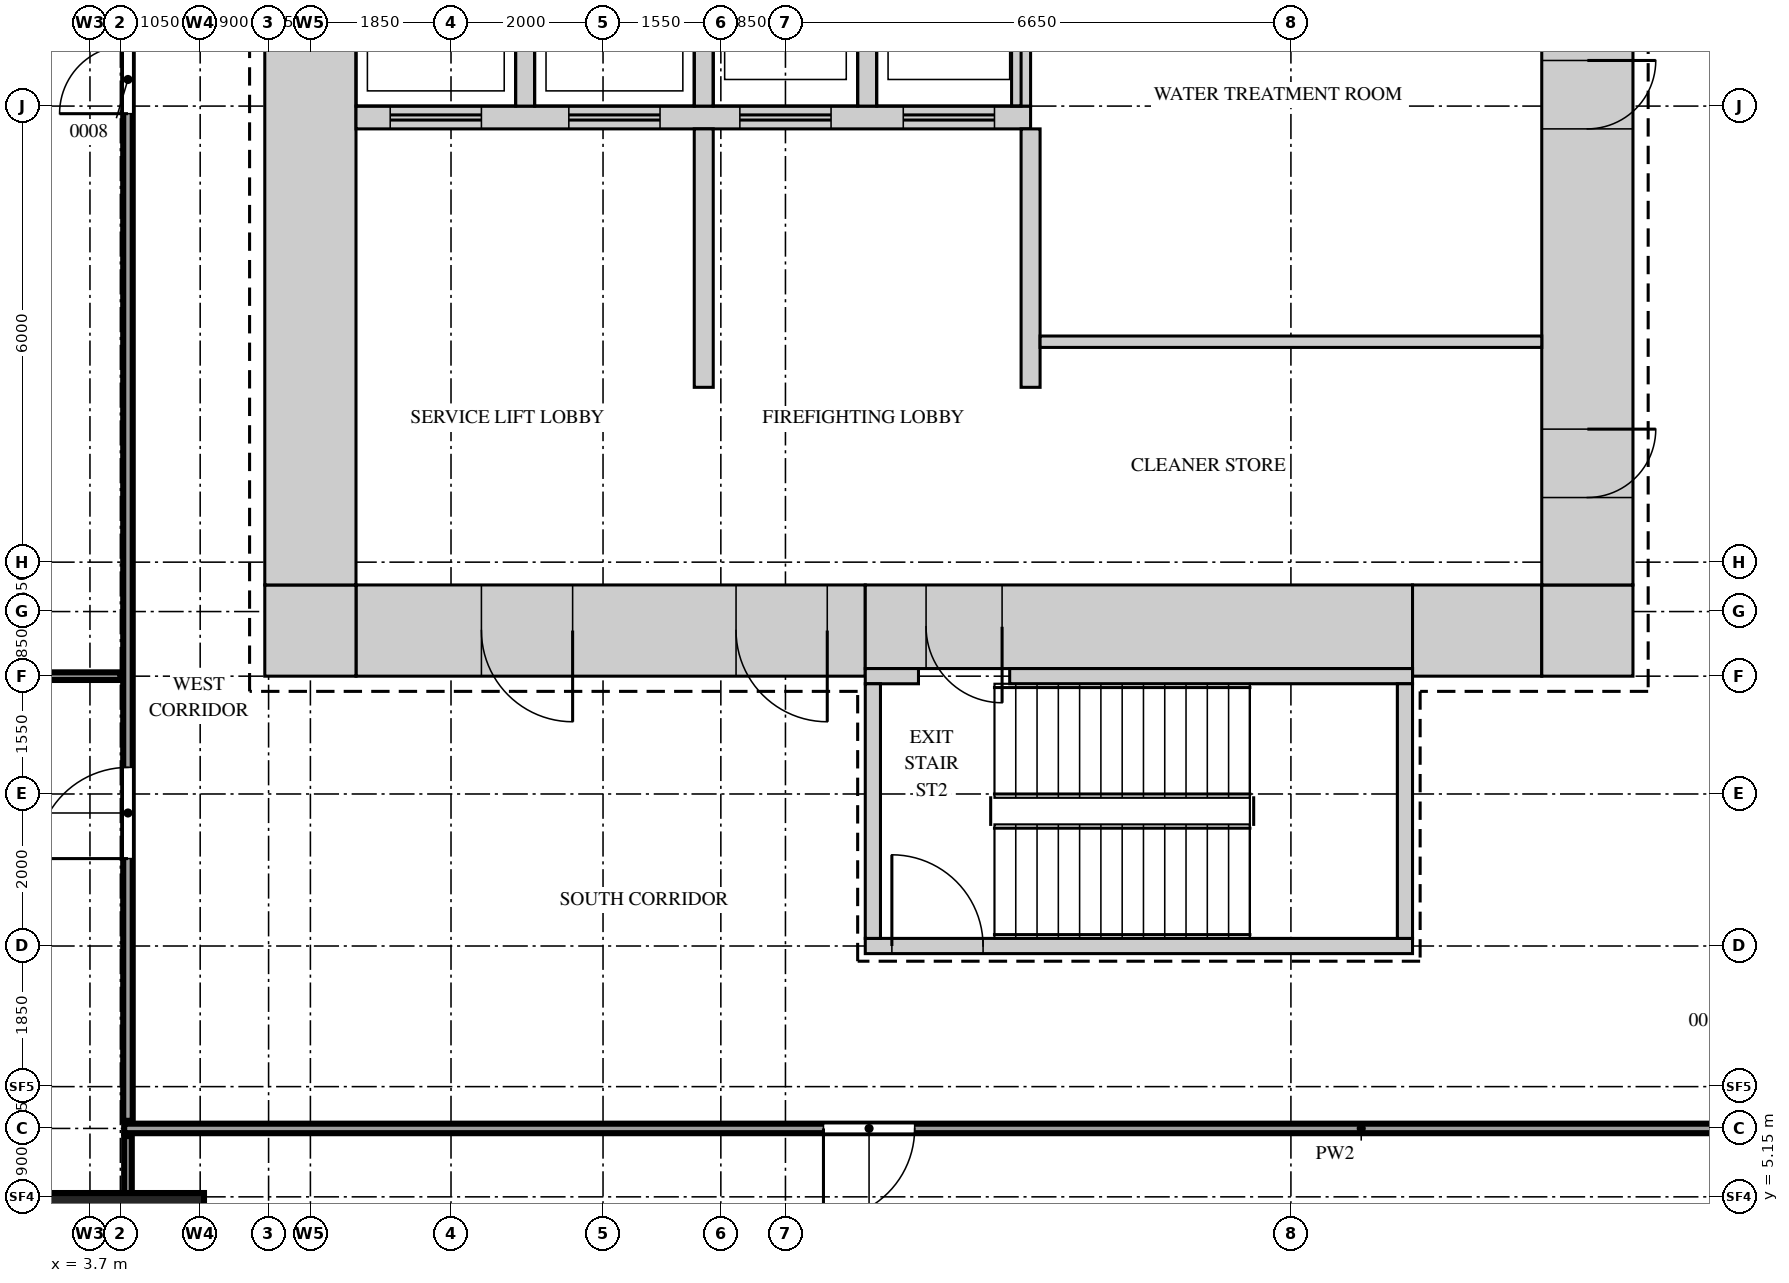
"""IFC4 building model, lengths in metres.
Left out: names, types, materials, properties, quantities, classifications, styles, units other than length and angle.
Written with IfcOpenShell. Run it as: python <this file> out.ifc"""

import sys

from ifc_helpers import new_model, si_unit, direction, frame, frame_2d, origin, origin_2d, place, context, subcontext, project, spatial, rectangle, extrude, source, transform, mapped, element, fill, save


model = new_model("IFC4")
c1 = context("Model", 3, precision=1e-05, world=origin(), true_north=direction((0.0, 1.0)))
c2 = subcontext(c1, "Body", "Model", "MODEL_VIEW")
j1 = project(units=[si_unit("LENGTHUNIT", "METRE"), si_unit("PLANEANGLEUNIT", "RADIAN")], contexts=[c1])
p1 = place(None, origin())
s1 = spatial("IfcSite", under=j1, at=p1, CompositionType="ELEMENT")
p2 = place(p1, origin())
s2 = spatial("IfcBuilding", under=s1, at=p2, CompositionType="ELEMENT")
p3 = place(p2, frame((0.0, 0.0, 82.5)))
s3 = spatial("IfcBuildingStorey", under=s2, at=p3, CompositionType="ELEMENT", Elevation=82.5)
m1 = source(origin(), c2, "Body", "SweptSolid", [
    extrude(rectangle(XDim=6.7, YDim=1.2, at=frame_2d((3.35, 0.0))), origin(), (0.0, 0.0, 1.0), 4.2),
])
p4 = place(p3, frame((7.2, 12.6, 0.0), z_axis=(0.0, 0.0, 1.0), x_axis=(1.0, 0.0, 0.0)))
e1 = element("IfcWall", 1, at=p4, inside=s3, PredefinedType="SHEAR", context=c2, shape_type="MappedRepresentation", body=[
    mapped(m1, transform((0.0, 0.0, 0.0))),
])
m2 = source(origin(), c2, "Body", "SweptSolid", [
    extrude(rectangle(XDim=1.2, YDim=2.1, at=frame_2d((0.6, 1.05))), frame((0.0, 0.61, 0.0), z_axis=(0.0, -1.0, 0.0), x_axis=(1.0, 0.0, 0.0)), (0.0, 0.0, 1.0), 1.22),
])
p5 = place(p4, frame((5.0, 0.0, 0.0)))
e2 = element("IfcOpeningElement", 2, at=p5, cuts=e1, PredefinedType="OPENING", context=c2, shape_type="MappedRepresentation", body=[
    mapped(m2, transform((0.0, 0.0, 0.0))),
])
p6 = place(p4, frame((1.65, 0.0, 0.0)))
e3 = element("IfcOpeningElement", 3, at=p6, cuts=e1, PredefinedType="OPENING", context=c2, shape_type="MappedRepresentation", body=[
    mapped(m2, transform((0.0, 0.0, 0.0))),
])
m3 = source(origin(), c2, "Body", "SweptSolid", [
    extrude(rectangle(XDim=7.2, YDim=1.1, at=frame_2d((3.6, 0.0))), origin(), (0.0, 0.0, 1.0), 4.2),
])
p7 = place(p3, frame((13.9, 12.65, 0.0), z_axis=(0.0, 0.0, 1.0), x_axis=(1.0, 0.0, 0.0)))
e4 = element("IfcWall", 4, at=p7, inside=s3, PredefinedType="SHEAR", context=c2, shape_type="MappedRepresentation", body=[
    mapped(m3, transform((0.0, 0.0, 0.0))),
])
m4 = source(origin(), c2, "Body", "SweptSolid", [
    extrude(rectangle(XDim=1.0, YDim=2.1, at=frame_2d((0.5, 1.05))), frame((0.0, 0.56, 0.0), z_axis=(0.0, -1.0, 0.0), x_axis=(1.0, 0.0, 0.0)), (0.0, 0.0, 1.0), 1.12),
])
p8 = place(p7, frame((0.8, 0.0, 0.0)))
e5 = element("IfcOpeningElement", 5, at=p8, cuts=e4, PredefinedType="OPENING", context=c2, shape_type="MappedRepresentation", body=[
    mapped(m4, transform((0.0, 0.0, 0.0))),
])
m5 = source(origin(), c2, "Body", "SweptSolid", [
    extrude(rectangle(XDim=1.7, YDim=1.2, at=frame_2d((0.85, 0.0))), origin(), (0.0, 0.0, 1.0), 4.2),
])
p9 = place(p3, frame((21.1, 12.6, 0.0), z_axis=(0.0, 0.0, 1.0), x_axis=(1.0, 0.0, 0.0)))
e6 = element("IfcWall", 6, at=p9, inside=s3, PredefinedType="SHEAR", context=c2, shape_type="MappedRepresentation", body=[
    mapped(m5, transform((0.0, 0.0, 0.0))),
])
m6 = source(origin(), c2, "Body", "SweptSolid", [
    extrude(rectangle(XDim=1.2, YDim=1.2, at=frame_2d((0.6, 0.0))), origin(), (0.0, 0.0, 1.0), 4.2),
])
for number, where, z_axis, x_axis in (
    (7, (22.8, 12.6, 0.0), (0.0, 0.0, 1.0), (1.0, 0.0, 0.0)),
    (8, (6.0, 12.6, 0.0), (0.0, 0.0, 1.0), (1.0, 0.0, 0.0)),
):
    element("IfcWall", number, at=place(p3, frame(where, z_axis=z_axis, x_axis=x_axis)), inside=s3, PredefinedType="SHEAR", context=c2, shape_type="MappedRepresentation", body=[
        mapped(m6, transform((0.0, 0.0, 0.0))),
    ])
m7 = source(origin(), c2, "Body", "SweptSolid", [
    extrude(rectangle(XDim=27.6, YDim=1.2, at=frame_2d((13.8, 0.0))), origin(), (0.0, 0.0, 1.0), 4.2),
])
p10 = place(p3, frame((23.4, 13.2, 0.0), z_axis=(0.0, 0.0, 1.0), x_axis=(0.0, 1.0, 0.0)))
e9 = element("IfcWall", 9, at=p10, inside=s3, PredefinedType="SHEAR", context=c2, shape_type="MappedRepresentation", body=[
    mapped(m7, transform((0.0, 0.0, 0.0))),
])
m8 = source(origin(), c2, "Body", "SweptSolid", [
    extrude(rectangle(XDim=1.8, YDim=2.1, at=frame_2d((0.9, 1.05))), frame((0.0, 0.61, 0.0), z_axis=(0.0, -1.0, 0.0), x_axis=(1.0, 0.0, 0.0)), (0.0, 0.0, 1.0), 1.22),
])
p11 = place(p10, frame((22.4, 0.0, 0.0)))
e10 = element("IfcOpeningElement", 10, at=p11, cuts=e9, PredefinedType="OPENING", context=c2, shape_type="MappedRepresentation", body=[
    mapped(m8, transform((0.0, 0.0, 0.0))),
])
p12 = place(p10, frame((14.4, 0.0, 0.0)))
e11 = element("IfcOpeningElement", 11, at=p12, cuts=e9, PredefinedType="OPENING", context=c2, shape_type="MappedRepresentation", body=[
    mapped(m2, transform((0.0, 0.0, 0.0))),
])
m9 = source(origin(), c2, "Body", "SweptSolid", [
    extrude(rectangle(XDim=0.9, YDim=2.1, at=frame_2d((0.45, 1.05))), frame((0.0, 0.61, 0.0), z_axis=(0.0, -1.0, 0.0), x_axis=(1.0, 0.0, 0.0)), (0.0, 0.0, 1.0), 1.22),
])
p13 = place(p10, frame((1.15, 0.0, 0.0)))
e12 = element("IfcOpeningElement", 12, at=p13, cuts=e9, PredefinedType="OPENING", context=c2, shape_type="MappedRepresentation", body=[
    mapped(m9, transform((0.0, 0.0, 0.0))),
])
p14 = place(p10, frame((6.0, 0.0, 0.0)))
e13 = element("IfcOpeningElement", 13, at=p14, cuts=e9, PredefinedType="OPENING", context=c2, shape_type="MappedRepresentation", body=[
    mapped(m9, transform((0.0, 0.0, 0.0))),
])
p15 = place(p3, frame((6.6, 13.2, 0.0), z_axis=(0.0, 0.0, 1.0), x_axis=(0.0, 1.0, 0.0)))
e14 = element("IfcWall", 14, at=p15, inside=s3, PredefinedType="SHEAR", context=c2, shape_type="MappedRepresentation", body=[
    mapped(m7, transform((0.0, 0.0, 0.0))),
])
m10 = source(origin(), c2, "Body", "SweptSolid", [
    extrude(rectangle(XDim=0.7, YDim=0.2, at=frame_2d((0.35, 0.0))), origin(), (0.0, 0.0, 1.0), 4.2),
])
p16 = place(p3, frame((13.9, 12.0, 0.0), z_axis=(0.0, 0.0, 1.0), x_axis=(1.0, 0.0, 0.0)))
e15 = element("IfcWall", 15, at=p16, inside=s3, PredefinedType="SHEAR", context=c2, shape_type="MappedRepresentation", body=[
    mapped(m10, transform((0.0, 0.0, 0.0))),
])
m11 = source(origin(), c2, "Body", "SweptSolid", [
    extrude(rectangle(XDim=5.3, YDim=0.2, at=frame_2d((2.65, 0.0))), origin(), (0.0, 0.0, 1.0), 4.2),
])
p17 = place(p3, frame((15.8, 12.0, 0.0), z_axis=(0.0, 0.0, 1.0), x_axis=(1.0, 0.0, 0.0)))
e16 = element("IfcWall", 16, at=p17, inside=s3, PredefinedType="SHEAR", context=c2, shape_type="MappedRepresentation", body=[
    mapped(m11, transform((0.0, 0.0, 0.0))),
])
m12 = source(origin(), c2, "Body", "SweptSolid", [
    extrude(rectangle(XDim=7.2, YDim=0.2, at=frame_2d((3.6, 0.0))), origin(), (0.0, 0.0, 1.0), 4.2),
])
p18 = place(p3, frame((13.9, 8.45, 0.0), z_axis=(0.0, 0.0, 1.0), x_axis=(1.0, 0.0, 0.0)))
e17 = element("IfcWall", 17, at=p18, inside=s3, PredefinedType="SHEAR", context=c2, shape_type="MappedRepresentation", body=[
    mapped(m12, transform((0.0, 0.0, 0.0))),
])
m13 = source(origin(), c2, "Body", "SweptSolid", [
    extrude(rectangle(XDim=1.2, YDim=2.1, at=frame_2d((0.6, 1.05))), frame((0.0, 0.11, 0.0), z_axis=(0.0, -1.0, 0.0), x_axis=(1.0, 0.0, 0.0)), (0.0, 0.0, 1.0), 0.22),
])
p19 = place(p18, frame((0.35, 0.0, 0.0)))
e18 = element("IfcOpeningElement", 18, at=p19, cuts=e17, PredefinedType="OPENING", context=c2, shape_type="MappedRepresentation", body=[
    mapped(m13, transform((0.0, 0.0, 0.0))),
])
m14 = source(origin(), c2, "Body", "SweptSolid", [
    extrude(rectangle(XDim=3.35, YDim=0.2, at=frame_2d((1.675, 0.0))), origin(), (0.0, 0.0, 1.0), 4.2),
])
for number, where, z_axis, x_axis in (
    (19, (21.0, 8.55, 0.0), (0.0, 0.0, 1.0), (0.0, 1.0, 0.0)),
    (20, (14.0, 8.55, 0.0), (0.0, 0.0, 1.0), (0.0, 1.0, 0.0)),
):
    element("IfcWall", number, at=place(p3, frame(where, z_axis=z_axis, x_axis=x_axis)), inside=s3, PredefinedType="SHEAR", context=c2, shape_type="MappedRepresentation", body=[
        mapped(m14, transform((0.0, 0.0, 0.0))),
    ])
m15 = source(origin(), c2, "Body", "SweptSolid", [
    extrude(rectangle(XDim=8.875, YDim=0.3, at=frame_2d((4.438, 0.0))), origin(), (0.0, 0.0, 1.0), 4.2),
])
p20 = place(p3, frame((7.2, 19.35, 0.0), z_axis=(0.0, 0.0, 1.0), x_axis=(1.0, 0.0, 0.0)))
e21 = element("IfcWall", 21, at=p20, inside=s3, PredefinedType="STANDARD", context=c2, shape_type="MappedRepresentation", body=[
    mapped(m15, transform((0.0, 0.0, 0.0))),
])
m16 = source(origin(), c2, "Body", "SweptSolid", [
    extrude(rectangle(XDim=1.2, YDim=2.1, at=frame_2d((0.6, 1.05))), frame((0.0, 0.16, 0.0), z_axis=(0.0, -1.0, 0.0), x_axis=(1.0, 0.0, 0.0)), (0.0, 0.0, 1.0), 0.32),
])
p21 = place(p20, frame((0.45, 0.0, 0.0)))
e22 = element("IfcOpeningElement", 22, at=p21, cuts=e21, PredefinedType="OPENING", context=c2, shape_type="MappedRepresentation", body=[
    mapped(m16, transform((0.0, 0.0, 0.0))),
])
p22 = place(p20, frame((2.8, 0.0, 0.0)))
e23 = element("IfcOpeningElement", 23, at=p22, cuts=e21, PredefinedType="OPENING", context=c2, shape_type="MappedRepresentation", body=[
    mapped(m16, transform((0.0, 0.0, 0.0))),
])
p23 = place(p20, frame((5.05, 0.0, 0.0)))
e24 = element("IfcOpeningElement", 24, at=p23, cuts=e21, PredefinedType="OPENING", context=c2, shape_type="MappedRepresentation", body=[
    mapped(m16, transform((0.0, 0.0, 0.0))),
])
p24 = place(p20, frame((7.2, 0.0, 0.0)))
e25 = element("IfcOpeningElement", 25, at=p24, cuts=e21, PredefinedType="OPENING", context=c2, shape_type="MappedRepresentation", body=[
    mapped(m16, transform((0.0, 0.0, 0.0))),
])
m17 = source(origin(), c2, "Body", "SweptSolid", [
    extrude(rectangle(XDim=3.1, YDim=0.25, at=frame_2d((1.55, 0.0))), origin(), (0.0, 0.0, 1.0), 4.2),
])
for number, where, z_axis, x_axis in (
    (26, (9.425, 19.5, 0.0), (0.0, 0.0, 1.0), (0.0, 1.0, 0.0)),
    (27, (11.775, 19.5, 0.0), (0.0, 0.0, 1.0), (0.0, 1.0, 0.0)),
    (28, (13.925, 19.5, 0.0), (0.0, 0.0, 1.0), (0.0, 1.0, 0.0)),
    (29, (15.95, 19.5, 0.0), (0.0, 0.0, 1.0), (0.0, 1.0, 0.0)),
):
    element("IfcWall", number, at=place(p3, frame(where, z_axis=z_axis, x_axis=x_axis)), inside=s3, PredefinedType="STANDARD", context=c2, shape_type="MappedRepresentation", body=[
        mapped(m17, transform((0.0, 0.0, 0.0))),
    ])
m18 = source(origin(), c2, "Body", "SweptSolid", [
    extrude(rectangle(XDim=3.4, YDim=0.25, at=frame_2d((1.7, 0.0))), origin(), (0.0, 0.0, 1.0), 4.2),
])
for number, where, z_axis, x_axis in (
    (30, (16.075, 15.8, 0.0), (0.0, 0.0, 1.0), (0.0, 1.0, 0.0)),
    (31, (11.775, 15.8, 0.0), (0.0, 0.0, 1.0), (0.0, 1.0, 0.0)),
):
    element("IfcWall", number, at=place(p3, frame(where, z_axis=z_axis, x_axis=x_axis)), inside=s3, PredefinedType="STANDARD", context=c2, shape_type="MappedRepresentation", body=[
        mapped(m18, transform((0.0, 0.0, 0.0))),
    ])
m19 = source(origin(), c2, "Body", "SweptSolid", [
    extrude(rectangle(XDim=2.2, YDim=2.2, at=origin_2d()), origin(), (0.0, 0.0, 1.0), 4.5),
])
p25 = place(p3, frame((4.1, 4.1, 0.0), z_axis=(0.0, 0.0, 1.0), x_axis=(1.0, 0.0, 0.0)))
e32 = element("IfcColumn", 32, at=p25, inside=s3, PredefinedType="COLUMN", context=c2, shape_type="MappedRepresentation", body=[
    mapped(m19, transform((0.0, 0.0, 0.0))),
])
m20 = source(origin(), c2, "Body", "SweptSolid", [
    extrude(rectangle(XDim=5.8, YDim=0.1, at=frame_2d((2.9, 0.0))), origin(), (0.0, 0.0, 1.0), 3.6),
])
p26 = place(p3, frame((4.2, 0.15, 0.0), z_axis=(0.0, 0.0, 1.0), x_axis=(0.0, 1.0, 0.0)))
e33 = element("IfcWall", 33, at=p26, inside=s3, PredefinedType="PARTITIONING", context=c2, shape_type="MappedRepresentation", body=[
    mapped(m20, transform((0.0, 0.0, 0.0))),
])
m21 = source(origin(), c2, "Body", "SweptSolid", [
    extrude(rectangle(XDim=22.15, YDim=0.125, at=frame_2d((11.075, 0.0))), origin(), (0.0, 0.0, 1.0), 4.3),
])
p27 = place(p3, frame((4.15, 6.05, 0.0), z_axis=(0.0, 0.0, 1.0), x_axis=(1.0, 0.0, 0.0)))
e34 = element("IfcWall", 34, at=p27, inside=s3, PredefinedType="PARTITIONING", context=c2, shape_type="MappedRepresentation", body=[
    mapped(m21, transform((0.0, 0.0, 0.0))),
])
m22 = source(origin(), c2, "Body", "SweptSolid", [
    extrude(rectangle(XDim=1.2, YDim=2.1, at=frame_2d((0.6, 1.05))), frame((0.0, 0.073, 0.0), z_axis=(0.0, -1.0, 0.0), x_axis=(1.0, 0.0, 0.0)), (0.0, 0.0, 1.0), 0.145),
])
p28 = place(p27, frame((9.2, 0.0, 0.0)))
e35 = element("IfcOpeningElement", 35, at=p28, cuts=e34, PredefinedType="OPENING", context=c2, shape_type="MappedRepresentation", body=[
    mapped(m22, transform((0.0, 0.0, 0.0))),
])
m23 = source(origin(), c2, "Body", "SweptSolid", [
    extrude(rectangle(XDim=41.8, YDim=0.125, at=frame_2d((20.9, 0.0))), origin(), (0.0, 0.0, 1.0), 4.3),
])
p29 = place(p3, frame((4.2, 6.15, 0.0), z_axis=(0.0, 0.0, 1.0), x_axis=(0.0, 1.0, 0.0)))
e36 = element("IfcWall", 36, at=p29, inside=s3, PredefinedType="PARTITIONING", context=c2, shape_type="MappedRepresentation", body=[
    mapped(m23, transform((0.0, 0.0, 0.0))),
])
p30 = place(p29, frame((3.45, 0.0, 0.0)))
e37 = element("IfcOpeningElement", 37, at=p30, cuts=e36, PredefinedType="OPENING", context=c2, shape_type="MappedRepresentation", body=[
    mapped(m22, transform((0.0, 0.0, 0.0))),
])
m24 = source(origin(), c2, "Body", "SweptSolid", [
    extrude(rectangle(XDim=0.9, YDim=2.1, at=frame_2d((0.45, 1.05))), frame((0.0, 0.073, 0.0), z_axis=(0.0, -1.0, 0.0), x_axis=(1.0, 0.0, 0.0)), (0.0, 0.0, 1.0), 0.145),
])
p31 = place(p29, frame((13.25, 0.0, 0.0)))
e38 = element("IfcOpeningElement", 38, at=p31, cuts=e36, PredefinedType="OPENING", context=c2, shape_type="MappedRepresentation", body=[
    mapped(m24, transform((0.0, 0.0, 0.0))),
])
p32 = place(p29, frame((30.35, 0.0, 0.0)))
e39 = element("IfcOpeningElement", 39, at=p32, cuts=e36, PredefinedType="OPENING", context=c2, shape_type="MappedRepresentation", body=[
    mapped(m24, transform((0.0, 0.0, 0.0))),
])
m25 = source(origin(), c2, "Body", "SweptSolid", [
    extrude(rectangle(XDim=3.95, YDim=0.1, at=frame_2d((1.975, 0.0))), origin(), (0.0, 0.0, 1.0), 4.3),
])
p33 = place(p3, frame((0.15, 12.0, 0.0), z_axis=(0.0, 0.0, 1.0), x_axis=(1.0, 0.0, 0.0)))
e40 = element("IfcWall", 40, at=p33, inside=s3, PredefinedType="PARTITIONING", context=c2, shape_type="MappedRepresentation", body=[
    mapped(m25, transform((0.0, 0.0, 0.0))),
])
m26 = source(origin(), c2, "Body", "SweptSolid", [
    extrude(rectangle(XDim=6.6, YDim=0.15, at=frame_2d((3.3, 0.0))), origin(), (0.0, 0.0, 1.0), 4.3),
])
p34 = place(p3, frame((16.2, 16.4, 0.0), z_axis=(0.0, 0.0, 1.0), x_axis=(1.0, 0.0, 0.0)))
e41 = element("IfcWall", 41, at=p34, inside=s3, PredefinedType="PARTITIONING", context=c2, shape_type="MappedRepresentation", body=[
    mapped(m26, transform((0.0, 0.0, 0.0))),
])
m27 = source(origin(), c2, "Body", "SweptSolid", [
    extrude(rectangle(XDim=0.9, YDim=2.1, at=frame_2d((0.45, 1.05))), frame((0.0, 0.55, 0.0), z_axis=(0.0, -1.0, 0.0), x_axis=(1.0, 0.0, 0.0)), (0.0, 0.0, 1.0), 1.1),
])
p35 = place(p13, origin())
e42 = element("IfcDoor", 42, at=p35, inside=s3, OperationType="SINGLE_SWING_RIGHT", PredefinedType="DOOR", context=c2, shape_type="MappedRepresentation", body=[
    mapped(m27, transform((0.0, 0.0, 0.0))),
])
fill(e12, e42)
p36 = place(p14, origin())
e43 = element("IfcDoor", 43, at=p36, inside=s3, OperationType="SINGLE_SWING_RIGHT", PredefinedType="DOOR", context=c2, shape_type="MappedRepresentation", body=[
    mapped(m27, transform((0.0, 0.0, 0.0))),
])
fill(e13, e43)
m28 = source(origin(), c2, "Body", "SweptSolid", [
    extrude(rectangle(XDim=1.2, YDim=2.1, at=frame_2d((0.6, 1.05))), frame((0.0, 0.55, 0.0), z_axis=(0.0, -1.0, 0.0), x_axis=(1.0, 0.0, 0.0)), (0.0, 0.0, 1.0), 1.1),
])
p37 = place(p5, origin())
e44 = element("IfcDoor", 44, at=p37, inside=s3, OperationType="SINGLE_SWING_RIGHT", PredefinedType="DOOR", context=c2, shape_type="MappedRepresentation", body=[
    mapped(m28, transform((0.0, 0.0, 0.0))),
])
fill(e2, e44)
p38 = place(p6, origin())
e45 = element("IfcDoor", 45, at=p38, inside=s3, OperationType="SINGLE_SWING_RIGHT", PredefinedType="DOOR", context=c2, shape_type="MappedRepresentation", body=[
    mapped(m28, transform((0.0, 0.0, 0.0))),
])
fill(e3, e45)
m29 = source(origin(), c2, "Body", "SweptSolid", [
    extrude(rectangle(XDim=1.0, YDim=2.1, at=frame_2d((0.5, 1.05))), frame((0.0, 0.5, 0.0), z_axis=(0.0, -1.0, 0.0), x_axis=(1.0, 0.0, 0.0)), (0.0, 0.0, 1.0), 1.0),
])
p39 = place(p8, origin())
e46 = element("IfcDoor", 46, at=p39, inside=s3, OperationType="SINGLE_SWING_RIGHT", PredefinedType="DOOR", context=c2, shape_type="MappedRepresentation", body=[
    mapped(m29, transform((0.0, 0.0, 0.0))),
])
fill(e5, e46)
m30 = source(origin(), c2, "Body", "SweptSolid", [
    extrude(rectangle(XDim=1.2, YDim=2.1, at=frame_2d((0.6, 1.05))), frame((0.0, 0.025, 0.0), z_axis=(0.0, -1.0, 0.0), x_axis=(1.0, 0.0, 0.0)), (0.0, 0.0, 1.0), 0.05),
])
p40 = place(p30, origin())
e47 = element("IfcDoor", 47, at=p40, inside=s3, OperationType="SINGLE_SWING_RIGHT", PredefinedType="DOOR", context=c2, shape_type="MappedRepresentation", body=[
    mapped(m30, transform((0.0, 0.0, 0.0))),
])
fill(e37, e47)
m31 = source(origin(), c2, "Body", "SweptSolid", [
    extrude(rectangle(XDim=0.9, YDim=2.1, at=frame_2d((0.45, 1.05))), frame((0.0, 0.025, 0.0), z_axis=(0.0, -1.0, 0.0), x_axis=(1.0, 0.0, 0.0)), (0.0, 0.0, 1.0), 0.05),
])
p41 = place(p31, origin())
e48 = element("IfcDoor", 48, at=p41, inside=s3, OperationType="SINGLE_SWING_RIGHT", PredefinedType="DOOR", context=c2, shape_type="MappedRepresentation", body=[
    mapped(m31, transform((0.0, 0.0, 0.0))),
])
fill(e38, e48)
p42 = place(p28, origin())
e49 = element("IfcDoor", 49, at=p42, inside=s3, OperationType="SINGLE_SWING_LEFT", PredefinedType="DOOR", context=c2, shape_type="MappedRepresentation", body=[
    mapped(m30, transform((0.0, 0.0, 0.0))),
])
fill(e35, e49)
p43 = place(p19, origin())
e50 = element("IfcDoor", 50, at=p43, inside=s3, OperationType="SINGLE_SWING_RIGHT", PredefinedType="DOOR", context=c2, shape_type="MappedRepresentation", body=[
    mapped(m30, transform((0.0, 0.0, 0.0))),
])
fill(e18, e50)
p44 = place(p21, origin())
e51 = element("IfcDoor", 51, at=p44, inside=s3, OperationType="DOUBLE_DOOR_SLIDING", PredefinedType="DOOR", context=c2, shape_type="MappedRepresentation", body=[
    mapped(m30, transform((0.0, 0.0, 0.0))),
])
fill(e22, e51)
p45 = place(p22, origin())
e52 = element("IfcDoor", 52, at=p45, inside=s3, OperationType="DOUBLE_DOOR_SLIDING", PredefinedType="DOOR", context=c2, shape_type="MappedRepresentation", body=[
    mapped(m30, transform((0.0, 0.0, 0.0))),
])
fill(e23, e52)
p46 = place(p23, origin())
e53 = element("IfcDoor", 53, at=p46, inside=s3, OperationType="DOUBLE_DOOR_SLIDING", PredefinedType="DOOR", context=c2, shape_type="MappedRepresentation", body=[
    mapped(m30, transform((0.0, 0.0, 0.0))),
])
fill(e24, e53)
p47 = place(p24, origin())
e54 = element("IfcDoor", 54, at=p47, inside=s3, OperationType="DOUBLE_DOOR_SLIDING", PredefinedType="DOOR", context=c2, shape_type="MappedRepresentation", body=[
    mapped(m30, transform((0.0, 0.0, 0.0))),
])
fill(e25, e54)
save(model, sys.argv[1])
